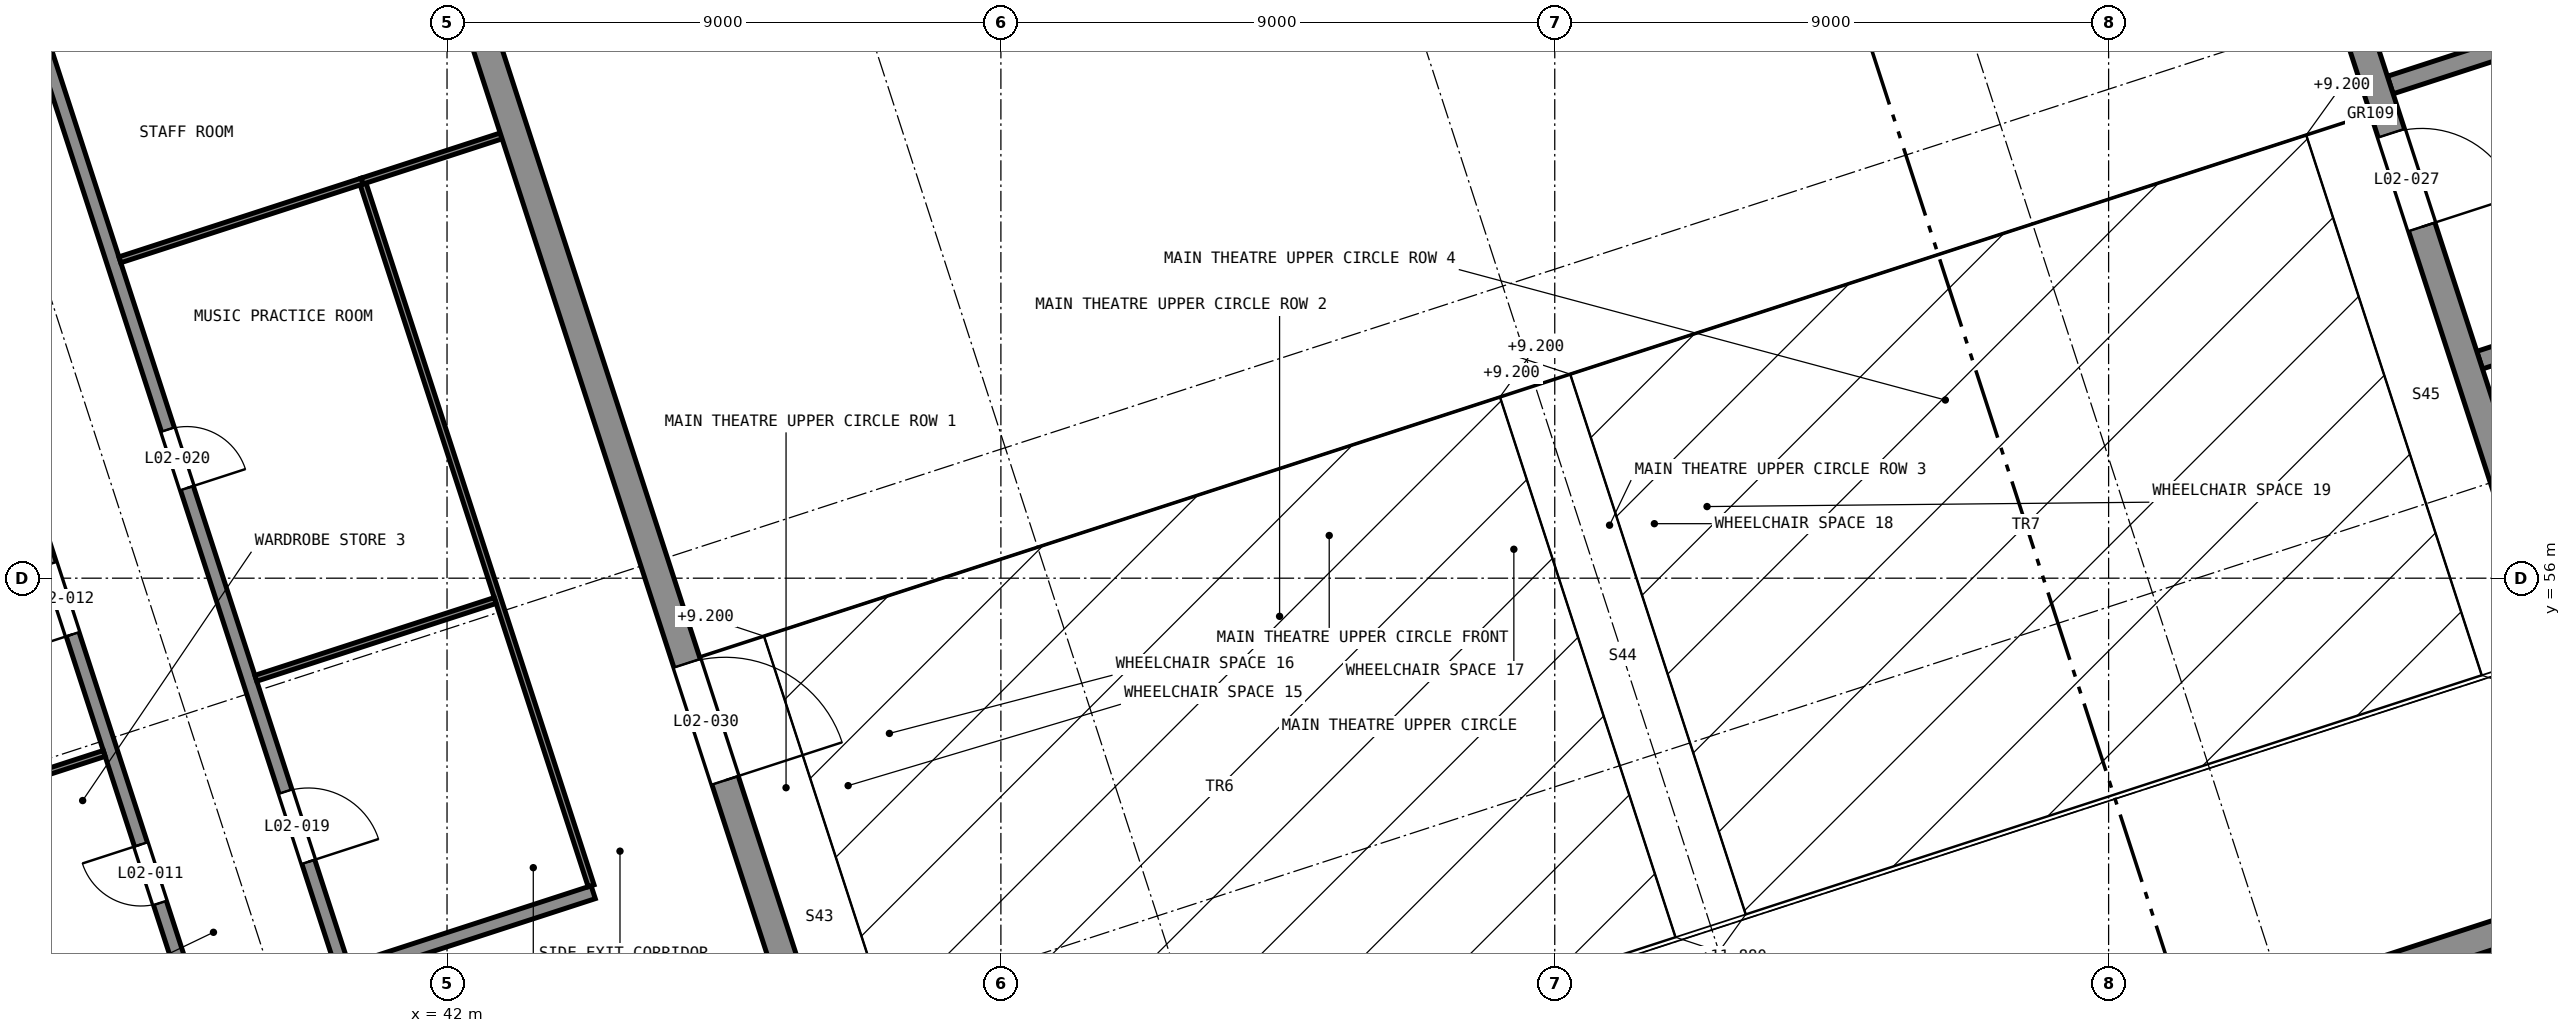
"""IFC4 building model, lengths in metres.
Left out: names, types, materials, properties, quantities, classifications, styles, units other than length and angle.
Written with IfcOpenShell. Run it as: python <this file> out.ifc"""

import sys

from ifc_helpers import new_model, si_unit, direction, frame, frame_2d, origin, place, context, subcontext, project, spatial, rectangle, extrude, element, fill, save


model = new_model("IFC4")
c1 = context("Model", 3, precision=1e-05, world=origin(), true_north=direction((0.0, 1.0)))
c2 = subcontext(c1, "Body", "Model", "MODEL_VIEW")
j1 = project(units=[si_unit("LENGTHUNIT", "METRE"), si_unit("PLANEANGLEUNIT", "RADIAN")], contexts=[c1])
p1 = place(None, origin())
s1 = spatial("IfcSite", under=j1, at=p1, CompositionType="ELEMENT")
p2 = place(p1, origin())
s2 = spatial("IfcBuilding", under=s1, at=p2, CompositionType="ELEMENT")
p3 = place(p2, frame((0.0, 0.0, 9.5)))
s3 = spatial("IfcBuildingStorey", under=s2, at=p3, CompositionType="ELEMENT", Elevation=9.5)
p4 = place(p3, frame((49.786, 41.93, 0.0), z_axis=(0.0, 0.0, 1.0), x_axis=(0.951055937194, 0.309018776661, 0.0)))
e1 = element("IfcWall", 1, at=p4, inside=s3, PredefinedType="SHEAR", context=c2, shape_type="SweptSolid", body=[
    extrude(rectangle(XDim=29.45, YDim=0.45, at=frame_2d((14.725, 0.0))), origin(), (0.0, 0.0, 1.0), 4.0),
])
p5 = place(p3, frame((49.93, 42.214, 0.0), z_axis=(0.0, 0.0, 1.0), x_axis=(-0.309016215614, 0.95105676933, 0.0)))
e2 = element("IfcWall", 2, at=p5, inside=s3, PredefinedType="SHEAR", context=c2, shape_type="SweptSolid", body=[
    extrude(rectangle(XDim=27.975, YDim=0.45, at=frame_2d((13.988, 0.0))), origin(), (0.0, 0.0, 1.0), 4.0),
])
p6 = place(p5, frame((11.042, 0.0, 0.0)))
e3 = element("IfcOpeningElement", 3, at=p6, cuts=e2, PredefinedType="OPENING", context=c2, shape_type="SweptSolid", body=[
    extrude(rectangle(XDim=2.0, YDim=2.4, at=frame_2d((1.0, 1.2))), frame((0.0, 0.235, 0.0), z_axis=(0.0, -1.0, 0.0), x_axis=(1.0, 0.0, 0.0)), (0.0, 0.0, 1.0), 0.47),
])
p7 = place(p3, frame((77.511, 51.176, 0.0), z_axis=(0.0, 0.0, 1.0), x_axis=(-0.309018780445, 0.951055935964, 0.0)))
e4 = element("IfcWall", 4, at=p7, inside=s3, PredefinedType="SHEAR", context=c2, shape_type="SweptSolid", body=[
    extrude(rectangle(XDim=27.975, YDim=0.45, at=frame_2d((13.987, 0.0))), origin(), (0.0, 0.0, 1.0), 4.0),
])
p8 = place(p7, frame((11.075, 0.0, 0.0)))
e5 = element("IfcOpeningElement", 5, at=p8, cuts=e4, PredefinedType="OPENING", context=c2, shape_type="SweptSolid", body=[
    extrude(rectangle(XDim=1.6, YDim=2.4, at=frame_2d((0.8, 1.2))), frame((0.0, 0.235, 0.0), z_axis=(0.0, -1.0, 0.0), x_axis=(1.0, 0.0, 0.0)), (0.0, 0.0, 1.0), 0.47),
])
p9 = place(p3, frame((75.029, 59.543, 0.0), z_axis=(0.0, 0.0, 1.0), x_axis=(0.951057649576, 0.309013506475, 0.0)))
e6 = element("IfcWall", 6, at=p9, inside=s3, PredefinedType="SOLIDWALL", context=c2, shape_type="SweptSolid", body=[
    extrude(rectangle(XDim=7.075, YDim=0.3, at=frame_2d((3.538, 0.0))), origin(), (0.0, 0.0, 1.0), 3.7),
])
p10 = place(p3, frame((80.305, 66.199, 0.0), z_axis=(0.0, 0.0, 1.0), x_axis=(-0.951054354327, -0.309023648149, 0.0)))
e7 = element("IfcWall", 7, at=p10, inside=s3, PredefinedType="SOLIDWALL", context=c2, shape_type="SweptSolid", body=[
    extrude(rectangle(XDim=7.075, YDim=0.3, at=frame_2d((3.537, 0.0))), origin(), (0.0, 0.0, 1.0), 3.7),
])
p11 = place(p3, frame((64.081, 45.859, 0.0), z_axis=(0.0, 0.0, 1.0), x_axis=(0.949388338269, 0.314104732786, 0.0)))
e8 = element("IfcWall", 8, at=p11, inside=s3, PredefinedType="SOLIDWALL", context=c2, shape_type="SweptSolid", body=[
    extrude(rectangle(XDim=15.116, YDim=0.22, at=frame_2d((7.558, 0.0))), origin(), (0.0, 0.0, 1.0), 3.7),
])
p12 = place(p3, frame((37.956, 48.812, 0.0), z_axis=(0.0, 0.0, 1.0), x_axis=(-0.30901736393, 0.951056396219, 0.0)))
e9 = element("IfcWall", 9, at=p12, inside=s3, PredefinedType="SOLIDWALL", context=c2, shape_type="SweptSolid", body=[
    extrude(rectangle(XDim=41.7, YDim=0.22, at=frame_2d((20.85, 0.0))), origin(), (0.0, 0.0, 1.0), 3.7),
])
p13 = place(p12, frame((2.009, 0.0, 0.0)))
e10 = element("IfcOpeningElement", 10, at=p13, cuts=e9, PredefinedType="OPENING", context=c2, shape_type="SweptSolid", body=[
    extrude(rectangle(XDim=1.0, YDim=2.1, at=frame_2d((0.5, 1.05))), frame((0.0, 0.12, 0.0), z_axis=(0.0, -1.0, 0.0), x_axis=(1.0, 0.0, 0.0)), (0.0, 0.0, 1.0), 0.24),
])
p14 = place(p12, frame((6.6, 0.0, 0.0)))
e11 = element("IfcOpeningElement", 11, at=p14, cuts=e9, PredefinedType="OPENING", context=c2, shape_type="SweptSolid", body=[
    extrude(rectangle(XDim=1.2, YDim=2.1, at=frame_2d((0.6, 1.05))), frame((0.0, 0.12, 0.0), z_axis=(0.0, -1.0, 0.0), x_axis=(1.0, 0.0, 0.0)), (0.0, 0.0, 1.0), 0.24),
])
p15 = place(p12, frame((11.7, 0.0, 0.0)))
e12 = element("IfcOpeningElement", 12, at=p15, cuts=e9, PredefinedType="OPENING", context=c2, shape_type="SweptSolid", body=[
    extrude(rectangle(XDim=1.2, YDim=2.1, at=frame_2d((0.6, 1.05))), frame((0.0, 0.12, 0.0), z_axis=(0.0, -1.0, 0.0), x_axis=(1.0, 0.0, 0.0)), (0.0, 0.0, 1.0), 0.24),
])
p16 = place(p12, frame((16.7, 0.0, 0.0)))
e13 = element("IfcOpeningElement", 13, at=p16, cuts=e9, PredefinedType="OPENING", context=c2, shape_type="SweptSolid", body=[
    extrude(rectangle(XDim=1.2, YDim=2.1, at=frame_2d((0.6, 1.05))), frame((0.0, 0.12, 0.0), z_axis=(0.0, -1.0, 0.0), x_axis=(1.0, 0.0, 0.0)), (0.0, 0.0, 1.0), 0.24),
])
p17 = place(p12, frame((21.7, 0.0, 0.0)))
e14 = element("IfcOpeningElement", 14, at=p17, cuts=e9, PredefinedType="OPENING", context=c2, shape_type="SweptSolid", body=[
    extrude(rectangle(XDim=1.2, YDim=2.1, at=frame_2d((0.6, 1.05))), frame((0.0, 0.12, 0.0), z_axis=(0.0, -1.0, 0.0), x_axis=(1.0, 0.0, 0.0)), (0.0, 0.0, 1.0), 0.24),
])
p18 = place(p12, frame((26.7, 0.0, 0.0)))
e15 = element("IfcOpeningElement", 15, at=p18, cuts=e9, PredefinedType="OPENING", context=c2, shape_type="SweptSolid", body=[
    extrude(rectangle(XDim=1.2, YDim=2.1, at=frame_2d((0.6, 1.05))), frame((0.0, 0.12, 0.0), z_axis=(0.0, -1.0, 0.0), x_axis=(1.0, 0.0, 0.0)), (0.0, 0.0, 1.0), 0.24),
])
p19 = place(p12, frame((31.739, 0.0, 0.0)))
e16 = element("IfcOpeningElement", 16, at=p19, cuts=e9, PredefinedType="OPENING", context=c2, shape_type="SweptSolid", body=[
    extrude(rectangle(XDim=1.2, YDim=2.1, at=frame_2d((0.6, 1.05))), frame((0.0, 0.12, 0.0), z_axis=(0.0, -1.0, 0.0), x_axis=(1.0, 0.0, 0.0)), (0.0, 0.0, 1.0), 0.24),
])
p20 = place(p3, frame((40.333, 49.584, 0.0), z_axis=(0.0, 0.0, 1.0), x_axis=(-0.309015643281, 0.951056955291, 0.0)))
e17 = element("IfcWall", 17, at=p20, inside=s3, PredefinedType="SOLIDWALL", context=c2, shape_type="SweptSolid", body=[
    extrude(rectangle(XDim=41.7, YDim=0.22, at=frame_2d((20.85, 0.0))), origin(), (0.0, 0.0, 1.0), 3.7),
])
p21 = place(p20, frame((1.9, 0.0, 0.0)))
e18 = element("IfcOpeningElement", 18, at=p21, cuts=e17, PredefinedType="OPENING", context=c2, shape_type="SweptSolid", body=[
    extrude(rectangle(XDim=1.2, YDim=2.1, at=frame_2d((0.6, 1.05))), frame((0.0, 0.12, 0.0), z_axis=(0.0, -1.0, 0.0), x_axis=(1.0, 0.0, 0.0)), (0.0, 0.0, 1.0), 0.24),
])
p22 = place(p20, frame((8.285, 0.0, 0.0)))
e19 = element("IfcOpeningElement", 19, at=p22, cuts=e17, PredefinedType="OPENING", context=c2, shape_type="SweptSolid", body=[
    extrude(rectangle(XDim=1.0, YDim=2.1, at=frame_2d((0.5, 1.05))), frame((0.0, 0.12, 0.0), z_axis=(0.0, -1.0, 0.0), x_axis=(1.0, 0.0, 0.0)), (0.0, 0.0, 1.0), 0.24),
])
p23 = place(p20, frame((16.475, 0.0, 0.0)))
e20 = element("IfcOpeningElement", 20, at=p23, cuts=e17, PredefinedType="OPENING", context=c2, shape_type="SweptSolid", body=[
    extrude(rectangle(XDim=1.0, YDim=2.1, at=frame_2d((0.5, 1.05))), frame((0.0, 0.12, 0.0), z_axis=(0.0, -1.0, 0.0), x_axis=(1.0, 0.0, 0.0)), (0.0, 0.0, 1.0), 0.24),
])
p24 = place(p20, frame((25.752, 0.0, 0.0)))
e21 = element("IfcOpeningElement", 21, at=p24, cuts=e17, PredefinedType="OPENING", context=c2, shape_type="SweptSolid", body=[
    extrude(rectangle(XDim=1.0, YDim=2.1, at=frame_2d((0.5, 1.05))), frame((0.0, 0.12, 0.0), z_axis=(0.0, -1.0, 0.0), x_axis=(1.0, 0.0, 0.0)), (0.0, 0.0, 1.0), 0.24),
])
p25 = place(p20, frame((32.761, 0.0, 0.0)))
e22 = element("IfcOpeningElement", 22, at=p25, cuts=e17, PredefinedType="OPENING", context=c2, shape_type="SweptSolid", body=[
    extrude(rectangle(XDim=1.0, YDim=2.1, at=frame_2d((0.5, 1.05))), frame((0.0, 0.12, 0.0), z_axis=(0.0, -1.0, 0.0), x_axis=(1.0, 0.0, 0.0)), (0.0, 0.0, 1.0), 0.24),
])
p26 = place(p3, frame((40.333, 49.584, 0.0), z_axis=(0.0, 0.0, 1.0), x_axis=(0.951062770994, 0.308997743729, 0.0)))
e23 = element("IfcWall", 23, at=p26, inside=s3, PredefinedType="SOLIDWALL", context=c2, shape_type="SweptSolid", body=[
    extrude(rectangle(XDim=4.25, YDim=0.22, at=frame_2d((2.125, 0.0))), origin(), (0.0, 0.0, 1.0), 3.7),
])
p27 = place(p3, frame((33.396, 52.167, 0.0), z_axis=(0.0, 0.0, 1.0), x_axis=(0.951044192343, 0.309054921027, 0.0)))
e24 = element("IfcWall", 24, at=p27, inside=s3, PredefinedType="PARTITIONING", context=c2, shape_type="SweptSolid", body=[
    extrude(rectangle(XDim=3.19, YDim=0.1, at=frame_2d((1.595, 0.0))), origin(), (0.0, 0.0, 1.0), 3.7),
])
p28 = place(p3, frame((38.893, 54.373, 0.0), z_axis=(0.0, 0.0, 1.0), x_axis=(0.951055560564, 0.309019935796, 0.0)))
e25 = element("IfcWall", 25, at=p28, inside=s3, PredefinedType="PARTITIONING", context=c2, shape_type="SweptSolid", body=[
    extrude(rectangle(XDim=4.09, YDim=0.1, at=frame_2d((2.045, 0.0))), origin(), (0.0, 0.0, 1.0), 3.7),
])
p29 = place(p3, frame((36.683, 61.173, 0.0), z_axis=(0.0, 0.0, 1.0), x_axis=(0.95105616864, 0.309018064344, 0.0)))
e26 = element("IfcWall", 26, at=p29, inside=s3, PredefinedType="PARTITIONING", context=c2, shape_type="SweptSolid", body=[
    extrude(rectangle(XDim=4.14, YDim=0.1, at=frame_2d((2.07, 0.0))), origin(), (0.0, 0.0, 1.0), 3.7),
])
p30 = place(p3, frame((40.621, 62.453, 0.0), z_axis=(0.0, 0.0, 1.0), x_axis=(0.951061260164, 0.309002393867, 0.0)))
e27 = element("IfcWall", 27, at=p30, inside=s3, PredefinedType="PARTITIONING", context=c2, shape_type="SweptSolid", body=[
    extrude(rectangle(XDim=2.375, YDim=0.1, at=frame_2d((1.188, 0.0))), origin(), (0.0, 0.0, 1.0), 3.7),
])
p31 = place(p3, frame((44.341, 51.002, 0.0), z_axis=(0.0, 0.0, 1.0), x_axis=(-0.309016547708, 0.951056661426, 0.0)))
e28 = element("IfcWall", 28, at=p31, inside=s3, PredefinedType="PARTITIONING", context=c2, shape_type="SweptSolid", body=[
    extrude(rectangle(XDim=11.99, YDim=0.1, at=frame_2d((5.995, 0.0))), origin(), (0.0, 0.0, 1.0), 3.7),
])
p32 = place(p13, origin())
e29 = element("IfcDoor", 29, at=p32, inside=s3, OperationType="SINGLE_SWING_LEFT", PredefinedType="DOOR", context=c2, shape_type="SweptSolid", body=[
    extrude(rectangle(XDim=1.0, YDim=2.1, at=frame_2d((0.5, 1.05))), frame((0.0, 0.025, 0.0), z_axis=(0.0, -1.0, 0.0), x_axis=(1.0, 0.0, 0.0)), (0.0, 0.0, 1.0), 0.05),
])
fill(e10, e29)
p33 = place(p14, origin())
e30 = element("IfcDoor", 30, at=p33, inside=s3, OperationType="SINGLE_SWING_RIGHT", PredefinedType="DOOR", context=c2, shape_type="SweptSolid", body=[
    extrude(rectangle(XDim=1.2, YDim=2.1, at=frame_2d((0.6, 1.05))), frame((0.0, 0.025, 0.0), z_axis=(0.0, -1.0, 0.0), x_axis=(1.0, 0.0, 0.0)), (0.0, 0.0, 1.0), 0.05),
])
fill(e11, e30)
p34 = place(p21, frame((1.2, 0.0, 0.0), z_axis=(0.0, 0.0, 1.0), x_axis=(-1.0, 0.0, 0.0)))
e31 = element("IfcDoor", 31, at=p34, inside=s3, OperationType="SINGLE_SWING_LEFT", PredefinedType="DOOR", context=c2, shape_type="SweptSolid", body=[
    extrude(rectangle(XDim=1.2, YDim=2.1, at=frame_2d((0.6, 1.05))), frame((0.0, 0.025, 0.0), z_axis=(0.0, -1.0, 0.0), x_axis=(1.0, 0.0, 0.0)), (0.0, 0.0, 1.0), 0.05),
])
fill(e18, e31)
p35 = place(p22, frame((1.0, 0.0, 0.0), z_axis=(0.0, 0.0, 1.0), x_axis=(-1.0, 0.0, 0.0)))
e32 = element("IfcDoor", 32, at=p35, inside=s3, OperationType="SINGLE_SWING_LEFT", PredefinedType="DOOR", context=c2, shape_type="SweptSolid", body=[
    extrude(rectangle(XDim=1.0, YDim=2.1, at=frame_2d((0.5, 1.05))), frame((0.0, 0.025, 0.0), z_axis=(0.0, -1.0, 0.0), x_axis=(1.0, 0.0, 0.0)), (0.0, 0.0, 1.0), 0.05),
])
fill(e19, e32)
p36 = place(p8, frame((1.6, 0.0, 0.0), z_axis=(0.0, 0.0, 1.0), x_axis=(-1.0, 0.0, 0.0)))
e33 = element("IfcDoor", 33, at=p36, inside=s3, OperationType="DOUBLE_DOOR_SINGLE_SWING", PredefinedType="DOOR", context=c2, shape_type="SweptSolid", body=[
    extrude(rectangle(XDim=1.6, YDim=2.4, at=frame_2d((0.8, 1.2))), frame((0.0, 0.025, 0.0), z_axis=(0.0, -1.0, 0.0), x_axis=(1.0, 0.0, 0.0)), (0.0, 0.0, 1.0), 0.05),
])
fill(e5, e33)
p37 = place(p6, frame((2.0, 0.0, 0.0), z_axis=(0.0, 0.0, 1.0), x_axis=(-1.0, 0.0, 0.0)))
e34 = element("IfcDoor", 34, at=p37, inside=s3, OperationType="DOUBLE_DOOR_SINGLE_SWING", PredefinedType="DOOR", context=c2, shape_type="SweptSolid", body=[
    extrude(rectangle(XDim=2.0, YDim=2.4, at=frame_2d((1.0, 1.2))), frame((0.0, 0.025, 0.0), z_axis=(0.0, -1.0, 0.0), x_axis=(1.0, 0.0, 0.0)), (0.0, 0.0, 1.0), 0.05),
])
fill(e3, e34)
save(model, sys.argv[1])
